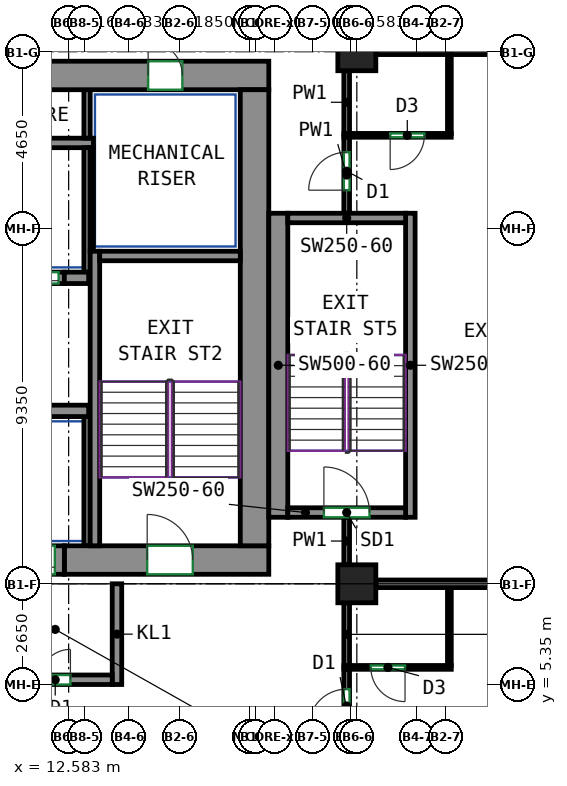
"""IFC4 building model, lengths in metres.
Left out: names, types, materials, properties, quantities, classifications, styles, units other than length and angle.
Written with IfcOpenShell. Run it as: python <this file> out.ifc"""

import sys

from ifc_helpers import new_model, si_unit, direction, frame, frame_2d, origin, origin_2d, place, context, subcontext, project, spatial, rectangle, extrude, source, transform, mapped, element, fill, save


model = new_model("IFC4")
c1 = context("Model", 3, precision=1e-05, world=origin(), true_north=direction((0.0, 1.0)))
c2 = subcontext(c1, "Body", "Model", "MODEL_VIEW")
j1 = project(units=[si_unit("LENGTHUNIT", "METRE"), si_unit("PLANEANGLEUNIT", "RADIAN")], contexts=[c1])
p1 = place(None, origin())
s1 = spatial("IfcSite", under=j1, at=p1, CompositionType="ELEMENT")
p2 = place(p1, origin())
s2 = spatial("IfcBuilding", under=s1, at=p2, CompositionType="ELEMENT")
p3 = place(p2, frame((0.0, 0.0, 203.3)))
s3 = spatial("IfcBuildingStorey", under=s2, at=p3, CompositionType="ELEMENT", Elevation=203.3)
m1 = source(origin(), c2, "Body", "SweptSolid", [
    extrude(rectangle(XDim=1.0, YDim=1.0, at=origin_2d()), origin(), (0.0, 0.0, 1.0), 3.12),
])
for number, where, z_axis, x_axis in (
    (1, (20.167, 8.0, 0.0), (0.0, 0.0, 1.0), (1.0, 0.0, 0.0)),
    (2, (20.167, 22.0, 0.0), (0.0, 0.0, 1.0), (1.0, 0.0, 0.0)),
):
    element("IfcColumn", number, at=place(p3, frame(where, z_axis=z_axis, x_axis=x_axis)), inside=s3, PredefinedType="COLUMN", context=c2, shape_type="MappedRepresentation", body=[
        mapped(m1, transform((0.0, 0.0, 0.0))),
    ])
m2 = source(origin(), c2, "Body", "SweptSolid", [
    extrude(rectangle(XDim=5.38, YDim=0.75, at=frame_2d((2.69, 0.0))), origin(), (0.0, 0.0, 1.0), 3.12),
])
p4 = place(p3, frame((12.47, 8.625, 0.0), z_axis=(0.0, 0.0, 1.0), x_axis=(1.0, 0.0, 0.0)))
e3 = element("IfcWall", 3, at=p4, inside=s3, PredefinedType="SHEAR", context=c2, shape_type="MappedRepresentation", body=[
    mapped(m2, transform((0.0, 0.0, 0.0))),
])
p5 = place(p4, frame((2.18, 0.0, 0.0)))
e4 = element("IfcOpeningElement", 4, at=p5, cuts=e3, PredefinedType="OPENING", context=c2, shape_type="SweptSolid", body=[
    extrude(rectangle(XDim=1.2, YDim=2.1, at=frame_2d((0.6, 1.05))), frame((0.0, 0.385, 0.0), z_axis=(0.0, -1.0, 0.0), x_axis=(1.0, 0.0, 0.0)), (0.0, 0.0, 1.0), 0.77),
])
m3 = source(origin(), c2, "Body", "SweptSolid", [
    extrude(rectangle(XDim=33.6, YDim=0.75, at=frame_2d((16.8, 0.0))), origin(), (0.0, 0.0, 1.0), 3.12),
])
p6 = place(p3, frame((-15.75, 21.375, 0.0), z_axis=(0.0, 0.0, 1.0), x_axis=(1.0, 0.0, 0.0)))
e5 = element("IfcWall", 5, at=p6, inside=s3, PredefinedType="SHEAR", context=c2, shape_type="MappedRepresentation", body=[
    mapped(m3, transform((0.0, 0.0, 0.0))),
])
p7 = place(p6, frame((6.581, 0.0, 0.0)))
e6 = element("IfcOpeningElement", 6, at=p7, cuts=e5, PredefinedType="OPENING", context=c2, shape_type="SweptSolid", body=[
    extrude(rectangle(XDim=0.9, YDim=2.1, at=frame_2d((0.45, 1.05))), frame((0.0, 0.385, 0.0), z_axis=(0.0, -1.0, 0.0), x_axis=(1.0, 0.0, 0.0)), (0.0, 0.0, 1.0), 0.77),
])
p8 = place(p6, frame((11.888, 0.0, 0.0)))
e7 = element("IfcOpeningElement", 7, at=p8, cuts=e5, PredefinedType="OPENING", context=c2, shape_type="SweptSolid", body=[
    extrude(rectangle(XDim=0.9, YDim=2.1, at=frame_2d((0.45, 1.05))), frame((0.0, 0.385, 0.0), z_axis=(0.0, -1.0, 0.0), x_axis=(1.0, 0.0, 0.0)), (0.0, 0.0, 1.0), 0.77),
])
p9 = place(p6, frame((16.296, 0.0, 0.0)))
e8 = element("IfcOpeningElement", 8, at=p9, cuts=e5, PredefinedType="OPENING", context=c2, shape_type="SweptSolid", body=[
    extrude(rectangle(XDim=0.9, YDim=2.1, at=frame_2d((0.45, 1.05))), frame((0.0, 0.385, 0.0), z_axis=(0.0, -1.0, 0.0), x_axis=(1.0, 0.0, 0.0)), (0.0, 0.0, 1.0), 0.77),
])
p10 = place(p6, frame((18.708, 0.0, 0.0)))
e9 = element("IfcOpeningElement", 9, at=p10, cuts=e5, PredefinedType="OPENING", context=c2, shape_type="SweptSolid", body=[
    extrude(rectangle(XDim=0.9, YDim=2.1, at=frame_2d((0.45, 1.05))), frame((0.0, 0.385, 0.0), z_axis=(0.0, -1.0, 0.0), x_axis=(1.0, 0.0, 0.0)), (0.0, 0.0, 1.0), 0.77),
])
p11 = place(p6, frame((21.536, 0.0, 0.0)))
e10 = element("IfcOpeningElement", 10, at=p11, cuts=e5, PredefinedType="OPENING", context=c2, shape_type="SweptSolid", body=[
    extrude(rectangle(XDim=0.9, YDim=2.1, at=frame_2d((0.45, 1.05))), frame((0.0, 0.385, 0.0), z_axis=(0.0, -1.0, 0.0), x_axis=(1.0, 0.0, 0.0)), (0.0, 0.0, 1.0), 0.77),
])
p12 = place(p6, frame((25.877, 0.0, 0.0)))
e11 = element("IfcOpeningElement", 11, at=p12, cuts=e5, PredefinedType="OPENING", context=c2, shape_type="SweptSolid", body=[
    extrude(rectangle(XDim=0.9, YDim=2.1, at=frame_2d((0.45, 1.05))), frame((0.0, 0.385, 0.0), z_axis=(0.0, -1.0, 0.0), x_axis=(1.0, 0.0, 0.0)), (0.0, 0.0, 1.0), 0.77),
])
p13 = place(p6, frame((2.275, 0.0, 0.0)))
e12 = element("IfcOpeningElement", 12, at=p13, cuts=e5, PredefinedType="OPENING", context=c2, shape_type="SweptSolid", body=[
    extrude(rectangle(XDim=0.9, YDim=2.1, at=frame_2d((0.45, 1.05))), frame((0.0, 0.385, 0.0), z_axis=(0.0, -1.0, 0.0), x_axis=(1.0, 0.0, 0.0)), (0.0, 0.0, 1.0), 0.77),
])
p14 = place(p6, frame((30.425, 0.0, 0.0)))
e13 = element("IfcOpeningElement", 13, at=p14, cuts=e5, PredefinedType="OPENING", context=c2, shape_type="SweptSolid", body=[
    extrude(rectangle(XDim=0.9, YDim=2.1, at=frame_2d((0.45, 1.05))), frame((0.0, 0.385, 0.0), z_axis=(0.0, -1.0, 0.0), x_axis=(1.0, 0.0, 0.0)), (0.0, 0.0, 1.0), 0.77),
])
m4 = source(origin(), c2, "Body", "SweptSolid", [
    extrude(rectangle(XDim=12.0, YDim=0.75, at=frame_2d((6.0, 0.0))), origin(), (0.0, 0.0, 1.0), 3.12),
])
p15 = place(p3, frame((17.475, 9.0, 0.0), z_axis=(0.0, 0.0, 1.0), x_axis=(0.0, 1.0, 0.0)))
e14 = element("IfcWall", 14, at=p15, inside=s3, PredefinedType="SHEAR", context=c2, shape_type="MappedRepresentation", body=[
    mapped(m4, transform((0.0, 0.0, 0.0))),
])
m5 = source(origin(), c2, "Body", "SweptSolid", [
    extrude(rectangle(XDim=7.75, YDim=0.25, at=frame_2d((3.875, 0.0))), origin(), (0.0, 0.0, 1.0), 3.12),
])
p16 = place(p3, frame((13.275, 9.0, 0.0), z_axis=(0.0, 0.0, 1.0), x_axis=(0.0, 1.0, 0.0)))
e15 = element("IfcWall", 15, at=p16, inside=s3, PredefinedType="SHEAR", context=c2, shape_type="MappedRepresentation", body=[
    mapped(m5, transform((0.0, 0.0, 0.0))),
])
m6 = source(origin(), c2, "Body", "SweptSolid", [
    extrude(rectangle(XDim=3.7, YDim=0.25, at=frame_2d((1.85, 0.0))), origin(), (0.0, 0.0, 1.0), 3.12),
])
p17 = place(p3, frame((13.4, 16.625, 0.0), z_axis=(0.0, 0.0, 1.0), x_axis=(1.0, 0.0, 0.0)))
e16 = element("IfcWall", 16, at=p17, inside=s3, PredefinedType="SHEAR", context=c2, shape_type="MappedRepresentation", body=[
    mapped(m6, transform((0.0, 0.0, 0.0))),
])
m7 = source(origin(), c2, "Body", "SweptSolid", [
    extrude(rectangle(XDim=8.0, YDim=0.5, at=frame_2d((4.0, 0.0))), origin(), (0.0, 0.0, 1.0), 3.12),
])
p18 = place(p3, frame((18.1, 9.75, 0.0), z_axis=(0.0, 0.0, 1.0), x_axis=(0.0, 1.0, 0.0)))
e17 = element("IfcWall", 17, at=p18, inside=s3, PredefinedType="SHEAR", context=c2, shape_type="MappedRepresentation", body=[
    mapped(m7, transform((0.0, 0.0, 0.0))),
])
m8 = source(origin(), c2, "Body", "SweptSolid", [
    extrude(rectangle(XDim=8.0, YDim=0.25, at=frame_2d((4.0, 0.0))), origin(), (0.0, 0.0, 1.0), 3.12),
])
p19 = place(p3, frame((21.575, 9.75, 0.0), z_axis=(0.0, 0.0, 1.0), x_axis=(0.0, 1.0, 0.0)))
e18 = element("IfcWall", 18, at=p19, inside=s3, PredefinedType="SHEAR", context=c2, shape_type="MappedRepresentation", body=[
    mapped(m8, transform((0.0, 0.0, 0.0))),
])
m9 = source(origin(), c2, "Body", "SweptSolid", [
    extrude(rectangle(XDim=3.1, YDim=0.25, at=frame_2d((1.55, 0.0))), origin(), (0.0, 0.0, 1.0), 3.12),
])
p20 = place(p3, frame((18.35, 9.875, 0.0), z_axis=(0.0, 0.0, 1.0), x_axis=(1.0, 0.0, 0.0)))
e19 = element("IfcWall", 19, at=p20, inside=s3, PredefinedType="SHEAR", context=c2, shape_type="MappedRepresentation", body=[
    mapped(m9, transform((0.0, 0.0, 0.0))),
])
p21 = place(p20, frame((0.95, 0.0, 0.0)))
e20 = element("IfcOpeningElement", 20, at=p21, cuts=e19, PredefinedType="OPENING", context=c2, shape_type="SweptSolid", body=[
    extrude(rectangle(XDim=1.2, YDim=2.1, at=frame_2d((0.6, 1.05))), frame((0.0, 0.135, 0.0), z_axis=(0.0, -1.0, 0.0), x_axis=(1.0, 0.0, 0.0)), (0.0, 0.0, 1.0), 0.27),
])
p22 = place(p3, frame((18.35, 17.625, 0.0), z_axis=(0.0, 0.0, 1.0), x_axis=(1.0, 0.0, 0.0)))
e21 = element("IfcWall", 21, at=p22, inside=s3, PredefinedType="SHEAR", context=c2, shape_type="MappedRepresentation", body=[
    mapped(m9, transform((0.0, 0.0, 0.0))),
])
m10 = source(origin(), c2, "Body", "SweptSolid", [
    extrude(rectangle(XDim=2.82, YDim=0.3, at=frame_2d((1.41, 0.0))), origin(), (0.0, 0.0, 1.0), 3.12),
])
p23 = place(p3, frame((10.29, 12.55, 0.0), z_axis=(0.0, 0.0, 1.0), x_axis=(1.0, 0.0, 0.0)))
e22 = element("IfcWall", 22, at=p23, inside=s3, PredefinedType="SHEAR", context=c2, shape_type="MappedRepresentation", body=[
    mapped(m10, transform((0.0, 0.0, 0.0))),
])
m11 = source(origin(), c2, "Body", "SweptSolid", [
    extrude(rectangle(XDim=0.64, YDim=0.3, at=frame_2d((0.32, 0.0))), origin(), (0.0, 0.0, 1.0), 3.12),
])
p24 = place(p3, frame((12.47, 16.05, 0.0), z_axis=(0.0, 0.0, 1.0), x_axis=(1.0, 0.0, 0.0)))
e23 = element("IfcWall", 23, at=p24, inside=s3, PredefinedType="SHEAR", context=c2, shape_type="MappedRepresentation", body=[
    mapped(m11, transform((0.0, 0.0, 0.0))),
])
m12 = source(origin(), c2, "Body", "SweptSolid", [
    extrude(rectangle(XDim=1.4, YDim=0.3, at=frame_2d((0.7, 0.0))), origin(), (0.0, 0.0, 1.0), 3.12),
])
p25 = place(p3, frame((11.07, 16.05, 0.0), z_axis=(0.0, 0.0, 1.0), x_axis=(1.0, 0.0, 0.0)))
e24 = element("IfcWall", 24, at=p25, inside=s3, PredefinedType="PARTITIONING", context=c2, shape_type="MappedRepresentation", body=[
    mapped(m12, transform((0.0, 0.0, 0.0))),
])
p26 = place(p25, frame((0.15, 0.0, 0.0)))
e25 = element("IfcOpeningElement", 25, at=p26, cuts=e24, PredefinedType="OPENING", context=c2, shape_type="SweptSolid", body=[
    extrude(rectangle(XDim=1.1, YDim=2.1, at=frame_2d((0.55, 1.05))), frame((0.0, 0.16, 0.0), z_axis=(0.0, -1.0, 0.0), x_axis=(1.0, 0.0, 0.0)), (0.0, 0.0, 1.0), 0.32),
])
m13 = source(origin(), c2, "Body", "SweptSolid", [
    extrude(rectangle(XDim=2.65, YDim=0.25, at=frame_2d((1.325, 0.0))), origin(), (0.0, 0.0, 1.0), 3.12),
])
p27 = place(p3, frame((13.855, 5.35, 0.0), z_axis=(0.0, 0.0, 1.0), x_axis=(0.0, 1.0, 0.0)))
e26 = element("IfcWall", 26, at=p27, inside=s3, PredefinedType="PARTITIONING", context=c2, shape_type="MappedRepresentation", body=[
    mapped(m13, transform((0.0, 0.0, 0.0))),
])
m14 = source(origin(), c2, "Body", "SweptSolid", [
    extrude(rectangle(XDim=3.0, YDim=0.25, at=frame_2d((1.5, 0.0))), origin(), (0.0, 0.0, 1.0), 3.12),
])
p28 = place(p3, frame((10.73, 5.475, 0.0), z_axis=(0.0, 0.0, 1.0), x_axis=(1.0, 0.0, 0.0)))
e27 = element("IfcWall", 27, at=p28, inside=s3, PredefinedType="PARTITIONING", context=c2, shape_type="MappedRepresentation", body=[
    mapped(m14, transform((0.0, 0.0, 0.0))),
])
p29 = place(p28, frame((1.1, 0.0, 0.0)))
e28 = element("IfcOpeningElement", 28, at=p29, cuts=e27, PredefinedType="OPENING", context=c2, shape_type="SweptSolid", body=[
    extrude(rectangle(XDim=0.8, YDim=2.0, at=frame_2d((0.4, 1.0))), frame((0.0, 0.135, 0.0), z_axis=(0.0, -1.0, 0.0), x_axis=(1.0, 0.0, 0.0)), (0.0, 0.0, 1.0), 0.27),
])
m15 = source(origin(), c2, "Body", "SweptSolid", [
    extrude(rectangle(XDim=10.97, YDim=0.25, at=frame_2d((5.485, 0.0))), origin(), (0.0, 0.0, 1.0), 3.12),
])
p30 = place(p3, frame((2.265, 19.6, 0.0), z_axis=(0.0, 0.0, 1.0), x_axis=(1.0, 0.0, 0.0)))
e29 = element("IfcWall", 29, at=p30, inside=s3, PredefinedType="PARTITIONING", context=c2, shape_type="MappedRepresentation", body=[
    mapped(m15, transform((0.0, 0.0, 0.0))),
])
m16 = source(origin(), c2, "Body", "SweptSolid", [
    extrude(rectangle(XDim=3.275, YDim=0.165, at=frame_2d((1.638, 0.0))), origin(), (0.0, 0.0, 1.0), 3.12),
])
p31 = place(p3, frame((13.067, 16.2, 0.0), z_axis=(0.0, 0.0, 1.0), x_axis=(0.0, 1.0, 0.0)))
e30 = element("IfcWall", 30, at=p31, inside=s3, PredefinedType="PARTITIONING", context=c2, shape_type="MappedRepresentation", body=[
    mapped(m16, transform((0.0, 0.0, 0.0))),
])
m17 = source(origin(), c2, "Body", "SweptSolid", [
    extrude(rectangle(XDim=1.275, YDim=0.165, at=frame_2d((0.637, 0.0))), origin(), (0.0, 0.0, 1.0), 3.12),
])
p32 = place(p3, frame((13.067, 19.725, 0.0), z_axis=(0.0, 0.0, 1.0), x_axis=(0.0, 1.0, 0.0)))
e31 = element("IfcWall", 31, at=p32, inside=s3, PredefinedType="PARTITIONING", context=c2, shape_type="MappedRepresentation", body=[
    mapped(m17, transform((0.0, 0.0, 0.0))),
])
m18 = source(origin(), c2, "Body", "SweptSolid", [
    extrude(rectangle(XDim=2.725, YDim=0.085, at=frame_2d((1.363, 0.0))), origin(), (0.0, 0.0, 1.0), 3.12),
])
p33 = place(p3, frame((13.192, 16.75, 0.0), z_axis=(0.0, 0.0, 1.0), x_axis=(0.0, 1.0, 0.0)))
e32 = element("IfcWall", 32, at=p33, inside=s3, PredefinedType="PARTITIONING", context=c2, shape_type="MappedRepresentation", body=[
    mapped(m18, transform((0.0, 0.0, 0.0))),
])
m19 = source(origin(), c2, "Body", "SweptSolid", [
    extrude(rectangle(XDim=3.4, YDim=0.165, at=frame_2d((1.7, 0.0))), origin(), (0.0, 0.0, 1.0), 3.12),
])
p34 = place(p3, frame((13.067, 9.0, 0.0), z_axis=(0.0, 0.0, 1.0), x_axis=(0.0, 1.0, 0.0)))
e33 = element("IfcWall", 33, at=p34, inside=s3, PredefinedType="PARTITIONING", context=c2, shape_type="MappedRepresentation", body=[
    mapped(m19, transform((0.0, 0.0, 0.0))),
])
m20 = source(origin(), c2, "Body", "SweptSolid", [
    extrude(rectangle(XDim=1.4, YDim=0.75, at=frame_2d((0.7, 0.0))), origin(), (0.0, 0.0, 1.0), 2.7),
])
p35 = place(p3, frame((11.07, 8.625, 0.0), z_axis=(0.0, 0.0, 1.0), x_axis=(1.0, 0.0, 0.0)))
e34 = element("IfcWall", 34, at=p35, inside=s3, PredefinedType="PARTITIONING", context=c2, shape_type="MappedRepresentation", body=[
    mapped(m20, transform((0.0, 0.0, 0.0))),
])
p36 = place(p35, frame((0.25, 0.0, 0.0)))
e35 = element("IfcOpeningElement", 35, at=p36, cuts=e34, PredefinedType="OPENING", context=c2, shape_type="SweptSolid", body=[
    extrude(rectangle(XDim=0.9, YDim=2.1, at=frame_2d((0.45, 1.05))), frame((0.0, 0.385, 0.0), z_axis=(0.0, -1.0, 0.0), x_axis=(1.0, 0.0, 0.0)), (0.0, 0.0, 1.0), 0.77),
])
p37 = place(p3, frame((19.9, 3.809, 0.0), z_axis=(0.0, 0.0, 1.0), x_axis=(0.0, 1.0, 0.0)))
e36 = element("IfcWall", 36, at=p37, inside=s3, PredefinedType="PARTITIONING", context=c2, shape_type="SweptSolid", body=[
    extrude(rectangle(XDim=1.951, YDim=0.15, at=frame_2d((0.976, 0.0))), origin(), (0.0, 0.0, 1.0), 2.52),
])
p38 = place(p37, frame((0.42, 0.0, 0.0)))
e37 = element("IfcOpeningElement", 37, at=p38, cuts=e36, PredefinedType="OPENING", context=c2, shape_type="SweptSolid", body=[
    extrude(rectangle(XDim=1.0, YDim=2.1, at=frame_2d((0.5, 1.05))), frame((0.0, 0.085, 0.0), z_axis=(0.0, -1.0, 0.0), x_axis=(1.0, 0.0, 0.0)), (0.0, 0.0, 1.0), 0.17),
])
p39 = place(p3, frame((19.9, 5.84, 0.0), z_axis=(0.0, 0.0, 1.0), x_axis=(0.0, 1.0, 0.0)))
e38 = element("IfcWall", 38, at=p39, inside=s3, PredefinedType="PARTITIONING", context=c2, shape_type="SweptSolid", body=[
    extrude(rectangle(XDim=1.66, YDim=0.15, at=frame_2d((0.83, 0.0))), origin(), (0.0, 0.0, 1.0), 2.52),
])
p40 = place(p3, frame((19.9, 17.75, 0.0), z_axis=(0.0, 0.0, 1.0), x_axis=(0.0, 1.0, 0.0)))
e39 = element("IfcWall", 39, at=p40, inside=s3, PredefinedType="PARTITIONING", context=c2, shape_type="SweptSolid", body=[
    extrude(rectangle(XDim=2.01, YDim=0.15, at=frame_2d((1.005, 0.0))), origin(), (0.0, 0.0, 1.0), 3.12),
])
p41 = place(p40, frame((0.607, 0.0, 0.0)))
e40 = element("IfcOpeningElement", 40, at=p41, cuts=e39, PredefinedType="OPENING", context=c2, shape_type="SweptSolid", body=[
    extrude(rectangle(XDim=1.0, YDim=2.1, at=frame_2d((0.5, 1.05))), frame((0.0, 0.085, 0.0), z_axis=(0.0, -1.0, 0.0), x_axis=(1.0, 0.0, 0.0)), (0.0, 0.0, 1.0), 0.17),
])
p42 = place(p3, frame((19.9, 8.5, 0.0), z_axis=(0.0, 0.0, 1.0), x_axis=(0.0, 1.0, 0.0)))
e41 = element("IfcWall", 41, at=p42, inside=s3, PredefinedType="PARTITIONING", context=c2, shape_type="SweptSolid", body=[
    extrude(rectangle(XDim=1.25, YDim=0.15, at=frame_2d((0.625, 0.0))), origin(), (0.0, 0.0, 1.0), 3.12),
])
p43 = place(p3, frame((20.667, 22.0, 0.0), z_axis=(0.0, 0.0, 1.0), x_axis=(1.0, 0.0, 0.0)))
e42 = element("IfcWall", 42, at=p43, inside=s3, PredefinedType="PARTITIONING", context=c2, shape_type="SweptSolid", body=[
    extrude(rectangle(XDim=7.158, YDim=0.15, at=frame_2d((3.579, 0.0))), origin(), (0.0, 0.0, 1.0), 3.12),
])
p44 = place(p3, frame((19.9, 19.84, 0.0), z_axis=(0.0, 0.0, 1.0), x_axis=(0.0, 1.0, 0.0)))
e43 = element("IfcWall", 43, at=p44, inside=s3, PredefinedType="PARTITIONING", context=c2, shape_type="SweptSolid", body=[
    extrude(rectangle(XDim=1.66, YDim=0.15, at=frame_2d((0.83, 0.0))), origin(), (0.0, 0.0, 1.0), 3.12),
])
p45 = place(p3, frame((22.652, 5.8, 0.0), z_axis=(0.0, 0.0, 1.0), x_axis=(-1.0, 0.0, 0.0)))
e44 = element("IfcWall", 44, at=p45, inside=s3, PredefinedType="PARTITIONING", context=c2, shape_type="SweptSolid", body=[
    extrude(rectangle(XDim=2.825, YDim=0.1, at=frame_2d((1.413, 0.0))), origin(), (0.0, 0.0, 1.0), 3.12),
])
p46 = place(p45, frame((1.217, 0.0, 0.0)))
e45 = element("IfcOpeningElement", 45, at=p46, cuts=e44, PredefinedType="OPENING", context=c2, shape_type="SweptSolid", body=[
    extrude(rectangle(XDim=0.9, YDim=2.1, at=frame_2d((0.45, 1.05))), frame((0.0, 0.06, 0.0), z_axis=(0.0, -1.0, 0.0), x_axis=(1.0, 0.0, 0.0)), (0.0, 0.0, 1.0), 0.12),
])
p47 = place(p3, frame((22.602, 5.85, 0.0), z_axis=(0.0, 0.0, 1.0), x_axis=(0.0, 1.0, 0.0)))
e46 = element("IfcWall", 46, at=p47, inside=s3, PredefinedType="PARTITIONING", context=c2, shape_type="SweptSolid", body=[
    extrude(rectangle(XDim=2.05, YDim=0.1, at=frame_2d((1.025, 0.0))), origin(), (0.0, 0.0, 1.0), 3.12),
])
p48 = place(p3, frame((20.667, 8.0, 0.0), z_axis=(0.0, 0.0, 1.0), x_axis=(1.0, 0.0, 0.0)))
e47 = element("IfcWall", 47, at=p48, inside=s3, PredefinedType="PARTITIONING", context=c2, shape_type="SweptSolid", body=[
    extrude(rectangle(XDim=9.758, YDim=0.2, at=frame_2d((4.879, 0.0))), origin(), (0.0, 0.0, 1.0), 2.52),
])
p49 = place(p3, frame((22.652, 19.8, 0.0), z_axis=(0.0, 0.0, 1.0), x_axis=(-1.0, 0.0, 0.0)))
e48 = element("IfcWall", 48, at=p49, inside=s3, PredefinedType="PARTITIONING", context=c2, shape_type="SweptSolid", body=[
    extrude(rectangle(XDim=2.825, YDim=0.1, at=frame_2d((1.413, 0.0))), origin(), (0.0, 0.0, 1.0), 3.12),
])
p50 = place(p49, frame((0.708, 0.0, 0.0)))
e49 = element("IfcOpeningElement", 49, at=p50, cuts=e48, PredefinedType="OPENING", context=c2, shape_type="SweptSolid", body=[
    extrude(rectangle(XDim=0.9, YDim=2.1, at=frame_2d((0.45, 1.05))), frame((0.0, 0.06, 0.0), z_axis=(0.0, -1.0, 0.0), x_axis=(1.0, 0.0, 0.0)), (0.0, 0.0, 1.0), 0.12),
])
p51 = place(p3, frame((22.602, 19.85, 0.0), z_axis=(0.0, 0.0, 1.0), x_axis=(0.0, 1.0, 0.0)))
e50 = element("IfcWall", 50, at=p51, inside=s3, PredefinedType="PARTITIONING", context=c2, shape_type="SweptSolid", body=[
    extrude(rectangle(XDim=2.073, YDim=0.1, at=frame_2d((1.037, 0.0))), origin(), (0.0, 0.0, 1.0), 3.12),
])
p52 = place(p29, origin())
e51 = element("IfcDoor", 51, at=p52, inside=s3, OperationType="SINGLE_SWING_RIGHT", PredefinedType="DOOR", context=c2, shape_type="SweptSolid", body=[
    extrude(rectangle(XDim=0.8, YDim=2.0, at=frame_2d((0.4, 1.0))), frame((0.0, 0.025, 0.0), z_axis=(0.0, -1.0, 0.0), x_axis=(1.0, 0.0, 0.0)), (0.0, 0.0, 1.0), 0.05),
])
fill(e28, e51)
p53 = place(p36, origin())
e52 = element("IfcDoor", 52, at=p53, inside=s3, OperationType="SLIDING_TO_LEFT", PredefinedType="DOOR", context=c2, shape_type="SweptSolid", body=[
    extrude(rectangle(XDim=0.9, YDim=2.1, at=frame_2d((0.45, 1.05))), frame((0.0, 0.28, 0.0), z_axis=(0.0, -1.0, 0.0), x_axis=(1.0, 0.0, 0.0)), (0.0, 0.0, 1.0), 0.05),
])
fill(e35, e52)
p54 = place(p26, origin())
e53 = element("IfcDoor", 53, at=p54, inside=s3, OperationType="DOUBLE_DOOR_SLIDING", PredefinedType="DOOR", context=c2, shape_type="SweptSolid", body=[
    extrude(rectangle(XDim=1.1, YDim=2.1, at=frame_2d((0.55, 1.05))), frame((0.0, 0.025, 0.0), z_axis=(0.0, -1.0, 0.0), x_axis=(1.0, 0.0, 0.0)), (0.0, 0.0, 1.0), 0.05),
])
fill(e25, e53)
p55 = place(p14, origin())
e54 = element("IfcDoor", 54, at=p55, inside=s3, OperationType="SINGLE_SWING_LEFT", PredefinedType="DOOR", context=c2, shape_type="SweptSolid", body=[
    extrude(rectangle(XDim=0.9, YDim=2.1, at=frame_2d((0.45, 1.05))), frame((0.0, -0.23, 0.0), z_axis=(0.0, -1.0, 0.0), x_axis=(1.0, 0.0, 0.0)), (0.0, 0.0, 1.0), 0.05),
])
fill(e13, e54)
p56 = place(p5, origin())
e55 = element("IfcDoor", 55, at=p56, inside=s3, OperationType="DOUBLE_DOOR_SINGLE_SWING", PredefinedType="DOOR", context=c2, shape_type="SweptSolid", body=[
    extrude(rectangle(XDim=1.2, YDim=2.1, at=frame_2d((0.6, 1.05))), frame((0.0, 0.28, 0.0), z_axis=(0.0, -1.0, 0.0), x_axis=(1.0, 0.0, 0.0)), (0.0, 0.0, 1.0), 0.05),
])
fill(e4, e55)
p57 = place(p21, origin())
e56 = element("IfcDoor", 56, at=p57, inside=s3, OperationType="DOUBLE_DOOR_SINGLE_SWING", PredefinedType="DOOR", context=c2, shape_type="SweptSolid", body=[
    extrude(rectangle(XDim=1.2, YDim=2.1, at=frame_2d((0.6, 1.05))), frame((0.0, 0.025, 0.0), z_axis=(0.0, -1.0, 0.0), x_axis=(1.0, 0.0, 0.0)), (0.0, 0.0, 1.0), 0.05),
])
fill(e20, e56)
p58 = place(p38, origin())
e57 = element("IfcDoor", 57, at=p58, inside=s3, OperationType="SINGLE_SWING_LEFT", PredefinedType="DOOR", context=c2, shape_type="SweptSolid", body=[
    extrude(rectangle(XDim=1.0, YDim=2.1, at=frame_2d((0.5, 1.05))), frame((0.0, 0.025, 0.0), z_axis=(0.0, -1.0, 0.0), x_axis=(1.0, 0.0, 0.0)), (0.0, 0.0, 1.0), 0.05),
])
fill(e37, e57)
p59 = place(p46, origin())
e58 = element("IfcDoor", 58, at=p59, inside=s3, OperationType="SINGLE_SWING_LEFT", PredefinedType="DOOR", context=c2, shape_type="SweptSolid", body=[
    extrude(rectangle(XDim=0.9, YDim=2.1, at=frame_2d((0.45, 1.05))), frame((0.0, 0.025, 0.0), z_axis=(0.0, -1.0, 0.0), x_axis=(1.0, 0.0, 0.0)), (0.0, 0.0, 1.0), 0.05),
])
fill(e45, e58)
p60 = place(p41, origin())
e59 = element("IfcDoor", 59, at=p60, inside=s3, OperationType="SINGLE_SWING_LEFT", PredefinedType="DOOR", context=c2, shape_type="SweptSolid", body=[
    extrude(rectangle(XDim=1.0, YDim=2.1, at=frame_2d((0.5, 1.05))), frame((0.0, 0.025, 0.0), z_axis=(0.0, -1.0, 0.0), x_axis=(1.0, 0.0, 0.0)), (0.0, 0.0, 1.0), 0.05),
])
fill(e40, e59)
p61 = place(p50, origin())
e60 = element("IfcDoor", 60, at=p61, inside=s3, OperationType="SINGLE_SWING_RIGHT", PredefinedType="DOOR", context=c2, shape_type="SweptSolid", body=[
    extrude(rectangle(XDim=0.9, YDim=2.1, at=frame_2d((0.45, 1.05))), frame((0.0, 0.025, 0.0), z_axis=(0.0, -1.0, 0.0), x_axis=(1.0, 0.0, 0.0)), (0.0, 0.0, 1.0), 0.05),
])
fill(e49, e60)
save(model, sys.argv[1])
